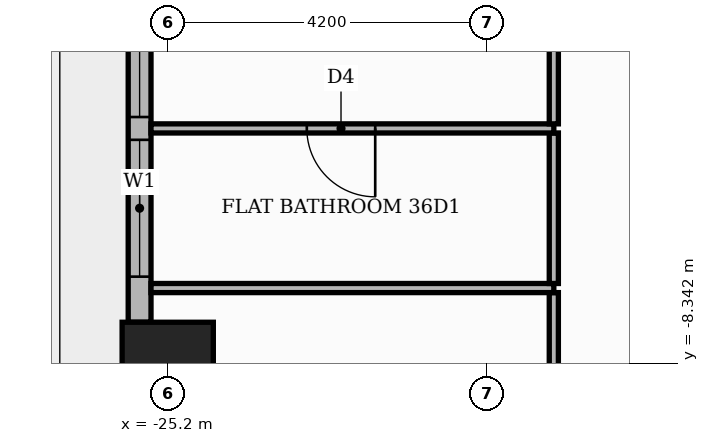
"""IFC4 building model, lengths in metres.
Left out: names, types, materials, properties, quantities, classifications, styles, units other than length and angle.
Written with IfcOpenShell. Run it as: python <this file> out.ifc"""

import sys

from ifc_helpers import new_model, si_unit, direction, frame, frame_2d, origin, origin_2d, place, context, subcontext, project, spatial, rectangle, extrude, element, fill, save


model = new_model("IFC4")
c1 = context("Model", 3, precision=1e-05, world=origin(), true_north=direction((0.0, 1.0)))
c2 = subcontext(c1, "Body", "Model", "MODEL_VIEW")
j1 = project(units=[si_unit("LENGTHUNIT", "METRE"), si_unit("PLANEANGLEUNIT", "RADIAN")], contexts=[c1])
p1 = place(None, origin())
s1 = spatial("IfcSite", under=j1, at=p1, CompositionType="ELEMENT")
p2 = place(p1, origin())
s2 = spatial("IfcBuilding", under=s1, at=p2, CompositionType="ELEMENT")
p3 = place(p2, frame((0.0, 0.0, 153.3)))
s3 = spatial("IfcBuildingStorey", under=s2, at=p3, CompositionType="ELEMENT", Elevation=153.3)
p4 = place(p3, frame((-25.2, -8.4, 0.0), z_axis=(0.0, 0.0, 1.0), x_axis=(1.0, 0.0, 0.0)))
e1 = element("IfcColumn", 1, at=p4, inside=s3, PredefinedType="COLUMN", context=c2, shape_type="SweptSolid", body=[
    extrude(rectangle(XDim=1.2, YDim=1.2, at=origin_2d()), origin(), (0.0, 0.0, 1.0), 3.9),
])
p5 = place(p3, frame((-25.57, -0.6, 0.0), z_axis=(0.0, 0.0, 1.0), x_axis=(0.0, -1.0, 0.0)))
e2 = element("IfcWall", 2, at=p5, inside=s3, PredefinedType="STANDARD", context=c2, shape_type="SweptSolid", body=[
    extrude(rectangle(XDim=7.2, YDim=0.3, at=frame_2d((3.6, 0.0))), origin(), (0.0, 0.0, 1.0), 3.48),
])
p6 = place(p5, frame((0.6, 0.0, 0.9)))
e3 = element("IfcOpeningElement", 3, at=p6, cuts=e2, PredefinedType="OPENING", context=c2, shape_type="SweptSolid", body=[
    extrude(rectangle(XDim=3.9, YDim=2.1, at=frame_2d((1.95, 1.05))), frame((0.0, 0.16, 0.0), z_axis=(0.0, -1.0, 0.0), x_axis=(1.0, 0.0, 0.0)), (0.0, 0.0, 1.0), 0.32),
])
p7 = place(p5, frame((4.8, 0.0, 0.9)))
e4 = element("IfcOpeningElement", 4, at=p7, cuts=e2, PredefinedType="OPENING", context=c2, shape_type="SweptSolid", body=[
    extrude(rectangle(XDim=1.8, YDim=2.1, at=frame_2d((0.9, 1.05))), frame((0.0, 0.16, 0.0), z_axis=(0.0, -1.0, 0.0), x_axis=(1.0, 0.0, 0.0)), (0.0, 0.0, 1.0), 0.32),
])
p8 = place(p3, frame((-20.12, -11.49, 0.0), z_axis=(0.0, 0.0, 1.0), x_axis=(0.0, 1.0, 0.0)))
e5 = element("IfcWall", 5, at=p8, inside=s3, PredefinedType="PARTITIONING", context=c2, shape_type="SweptSolid", body=[
    extrude(rectangle(XDim=4.08, YDim=0.12, at=frame_2d((2.04, 0.0))), origin(), (0.0, 0.0, 1.0), 3.48),
])
p9 = place(p8, frame((1.59, 0.0, 0.0)))
e6 = element("IfcOpeningElement", 6, at=p9, cuts=e5, PredefinedType="OPENING", context=c2, shape_type="SweptSolid", body=[
    extrude(rectangle(XDim=0.9, YDim=2.1, at=frame_2d((0.45, 1.05))), frame((0.0, 0.07, 0.0), z_axis=(0.0, -1.0, 0.0), x_axis=(1.0, 0.0, 0.0)), (0.0, 0.0, 1.0), 0.14),
])
p10 = place(p3, frame((-25.42, -7.35, 0.0), z_axis=(0.0, 0.0, 1.0), x_axis=(1.0, 0.0, 0.0)))
e7 = element("IfcWall", 7, at=p10, inside=s3, PredefinedType="PARTITIONING", context=c2, shape_type="SweptSolid", body=[
    extrude(rectangle(XDim=5.3, YDim=0.12, at=frame_2d((2.65, 0.0))), origin(), (0.0, 0.0, 1.0), 3.48),
])
p11 = place(p3, frame((-20.12, -7.29, 0.0), z_axis=(0.0, 0.0, 1.0), x_axis=(0.0, 1.0, 0.0)))
e8 = element("IfcWall", 8, at=p11, inside=s3, PredefinedType="PARTITIONING", context=c2, shape_type="SweptSolid", body=[
    extrude(rectangle(XDim=1.98, YDim=0.12, at=frame_2d((0.99, 0.0))), origin(), (0.0, 0.0, 1.0), 3.48),
])
p12 = place(p3, frame((-25.42, -5.25, 0.0), z_axis=(0.0, 0.0, 1.0), x_axis=(1.0, 0.0, 0.0)))
e9 = element("IfcWall", 9, at=p12, inside=s3, PredefinedType="PARTITIONING", context=c2, shape_type="SweptSolid", body=[
    extrude(rectangle(XDim=5.3, YDim=0.12, at=frame_2d((2.65, 0.0))), origin(), (0.0, 0.0, 1.0), 3.48),
])
p13 = place(p12, frame((2.05, 0.0, 0.0)))
e10 = element("IfcOpeningElement", 10, at=p13, cuts=e9, PredefinedType="OPENING", context=c2, shape_type="SweptSolid", body=[
    extrude(rectangle(XDim=0.9, YDim=2.1, at=frame_2d((0.45, 1.05))), frame((0.0, 0.07, 0.0), z_axis=(0.0, -1.0, 0.0), x_axis=(1.0, 0.0, 0.0)), (0.0, 0.0, 1.0), 0.14),
])
p14 = place(p3, frame((-20.12, -5.19, 0.0), z_axis=(0.0, 0.0, 1.0), x_axis=(0.0, 1.0, 0.0)))
e11 = element("IfcWall", 11, at=p14, inside=s3, PredefinedType="PARTITIONING", context=c2, shape_type="SweptSolid", body=[
    extrude(rectangle(XDim=4.08, YDim=0.12, at=frame_2d((2.04, 0.0))), origin(), (0.0, 0.0, 1.0), 3.48),
])
p15 = place(p14, frame((1.59, 0.0, 0.0)))
e12 = element("IfcOpeningElement", 12, at=p15, cuts=e11, PredefinedType="OPENING", context=c2, shape_type="SweptSolid", body=[
    extrude(rectangle(XDim=0.9, YDim=2.1, at=frame_2d((0.45, 1.05))), frame((0.0, 0.07, 0.0), z_axis=(0.0, -1.0, 0.0), x_axis=(1.0, 0.0, 0.0)), (0.0, 0.0, 1.0), 0.14),
])
p16 = place(p6, origin())
e13 = element("IfcWindow", 13, at=p16, inside=s3, PartitioningType="SINGLE_PANEL", PredefinedType="WINDOW", context=c2, shape_type="SweptSolid", body=[
    extrude(rectangle(XDim=3.9, YDim=2.1, at=frame_2d((1.95, 1.05))), frame((0.0, 0.03, 0.0), z_axis=(0.0, -1.0, 0.0), x_axis=(1.0, 0.0, 0.0)), (0.0, 0.0, 1.0), 0.06),
])
fill(e3, e13)
p17 = place(p7, origin())
e14 = element("IfcWindow", 14, at=p17, inside=s3, PartitioningType="SINGLE_PANEL", PredefinedType="WINDOW", context=c2, shape_type="SweptSolid", body=[
    extrude(rectangle(XDim=1.8, YDim=2.1, at=frame_2d((0.9, 1.05))), frame((0.0, 0.03, 0.0), z_axis=(0.0, -1.0, 0.0), x_axis=(1.0, 0.0, 0.0)), (0.0, 0.0, 1.0), 0.06),
])
fill(e4, e14)
p18 = place(p13, frame((0.9, 0.0, 0.0), z_axis=(0.0, 0.0, 1.0), x_axis=(-1.0, 0.0, 0.0)))
e15 = element("IfcDoor", 15, at=p18, inside=s3, OperationType="SINGLE_SWING_RIGHT", PredefinedType="DOOR", context=c2, shape_type="SweptSolid", body=[
    extrude(rectangle(XDim=0.9, YDim=2.1, at=frame_2d((0.45, 1.05))), frame((0.0, 0.025, 0.0), z_axis=(0.0, -1.0, 0.0), x_axis=(1.0, 0.0, 0.0)), (0.0, 0.0, 1.0), 0.05),
])
fill(e10, e15)
save(model, sys.argv[1])
